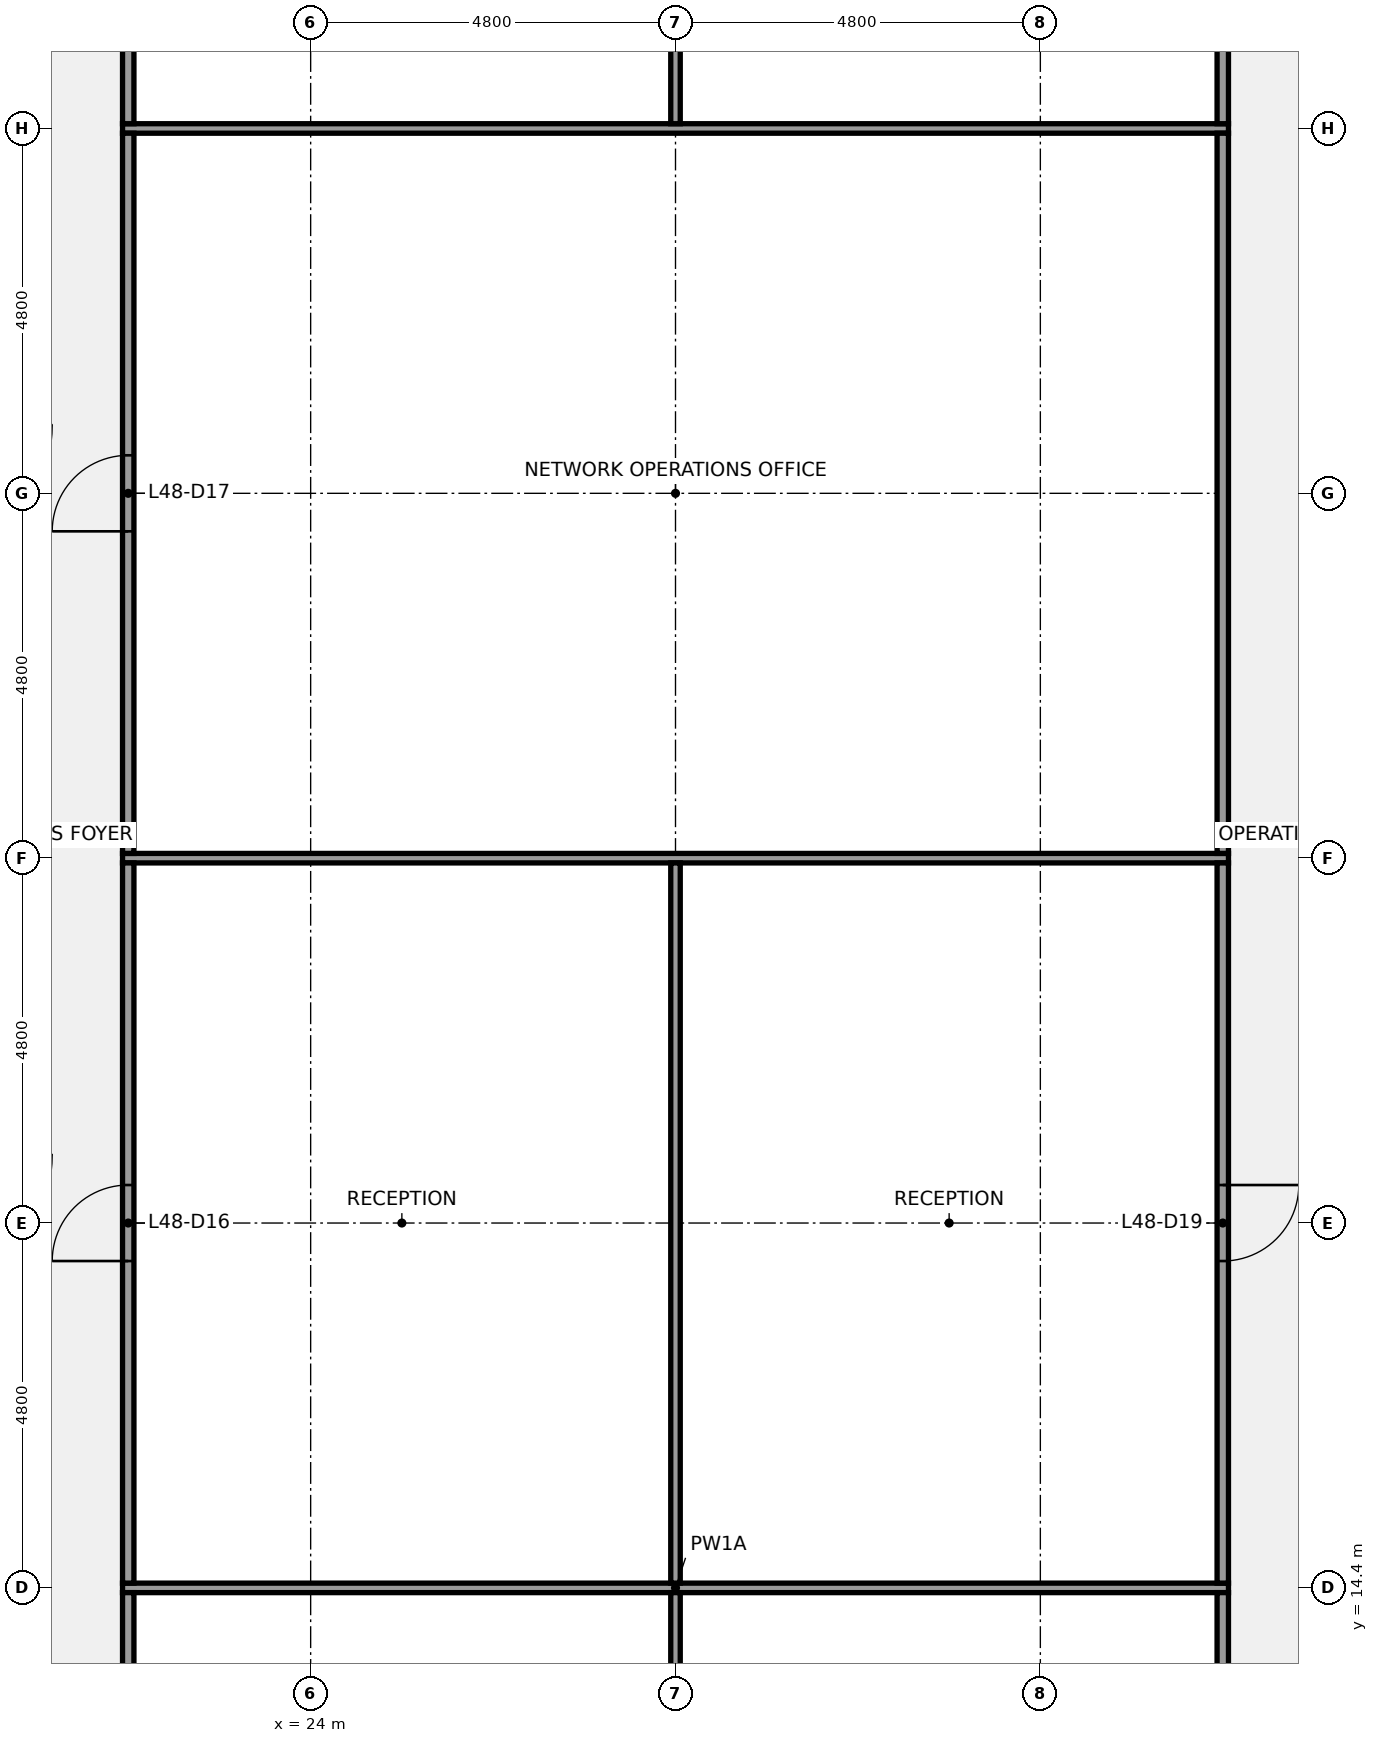
"""IFC4 building model, lengths in metres.
Left out: names, types, materials, properties, quantities, classifications, styles, units other than length and angle.
Written with IfcOpenShell. Run it as: python <this file> out.ifc"""

import sys

from ifc_helpers import new_model, si_unit, direction, frame, frame_2d, origin, place, context, subcontext, project, spatial, rectangle, extrude, element, fill, save


model = new_model("IFC4")
c1 = context("Model", 3, precision=1e-05, world=origin(), true_north=direction((0.0, 1.0)))
c2 = subcontext(c1, "Body", "Model", "MODEL_VIEW")
j1 = project(units=[si_unit("LENGTHUNIT", "METRE"), si_unit("PLANEANGLEUNIT", "RADIAN")], contexts=[c1])
p1 = place(None, origin())
s1 = spatial("IfcSite", under=j1, at=p1, CompositionType="ELEMENT")
p2 = place(p1, origin())
s2 = spatial("IfcBuilding", under=s1, at=p2, CompositionType="ELEMENT")
p3 = place(p2, frame((0.0, 0.0, 221.2)))
s3 = spatial("IfcBuildingStorey", under=s2, at=p3, CompositionType="ELEMENT", Elevation=221.2)
for number, where, z_axis, x_axis in (
    (1, (21.525, 14.4, 0.0), (0.0, 0.0, 1.0), (1.0, 0.0, 0.0)),
    (2, (21.525, 24.0, 0.0), (0.0, 0.0, 1.0), (1.0, 0.0, 0.0)),
    (3, (21.525, 33.6, 0.0), (0.0, 0.0, 1.0), (1.0, 0.0, 0.0)),
):
    element("IfcWall", number, at=place(p3, frame(where, z_axis=z_axis, x_axis=x_axis)), inside=s3, PredefinedType="PARTITIONING", context=c2, shape_type="SweptSolid", body=[
        extrude(rectangle(XDim=14.55, YDim=0.125, at=frame_2d((7.275, 0.0))), origin(), (0.0, 0.0, 1.0), 2.87),
    ])
p4 = place(p3, frame((21.6, 7.275, 0.0), z_axis=(0.0, 0.0, 1.0), x_axis=(0.0, 1.0, 0.0)))
e4 = element("IfcWall", 4, at=p4, inside=s3, PredefinedType="PARTITIONING", context=c2, shape_type="SweptSolid", body=[
    extrude(rectangle(XDim=7.062, YDim=0.15, at=frame_2d((3.531, 0.0))), origin(), (0.0, 0.0, 1.0), 2.87),
])
p5 = place(p4, frame((3.031, 0.0, 0.0)))
e5 = element("IfcOpeningElement", 5, at=p5, cuts=e4, PredefinedType="OPENING", context=c2, shape_type="SweptSolid", body=[
    extrude(rectangle(XDim=1.0, YDim=2.1, at=frame_2d((0.5, 1.05))), frame((0.0, 0.085, 0.0), z_axis=(0.0, -1.0, 0.0), x_axis=(1.0, 0.0, 0.0)), (0.0, 0.0, 1.0), 0.17),
])
p6 = place(p3, frame((21.6, 14.462, 0.0), z_axis=(0.0, 0.0, 1.0), x_axis=(0.0, 1.0, 0.0)))
e6 = element("IfcWall", 6, at=p6, inside=s3, PredefinedType="PARTITIONING", context=c2, shape_type="SweptSolid", body=[
    extrude(rectangle(XDim=9.475, YDim=0.15, at=frame_2d((4.738, 0.0))), origin(), (0.0, 0.0, 1.0), 2.87),
])
p7 = place(p6, frame((4.238, 0.0, 0.0)))
e7 = element("IfcOpeningElement", 7, at=p7, cuts=e6, PredefinedType="OPENING", context=c2, shape_type="SweptSolid", body=[
    extrude(rectangle(XDim=1.0, YDim=2.1, at=frame_2d((0.5, 1.05))), frame((0.0, 0.085, 0.0), z_axis=(0.0, -1.0, 0.0), x_axis=(1.0, 0.0, 0.0)), (0.0, 0.0, 1.0), 0.17),
])
p8 = place(p3, frame((21.6, 24.062, 0.0), z_axis=(0.0, 0.0, 1.0), x_axis=(0.0, 1.0, 0.0)))
e8 = element("IfcWall", 8, at=p8, inside=s3, PredefinedType="PARTITIONING", context=c2, shape_type="SweptSolid", body=[
    extrude(rectangle(XDim=9.475, YDim=0.15, at=frame_2d((4.738, 0.0))), origin(), (0.0, 0.0, 1.0), 2.87),
])
p9 = place(p8, frame((4.238, 0.0, 0.0)))
e9 = element("IfcOpeningElement", 9, at=p9, cuts=e8, PredefinedType="OPENING", context=c2, shape_type="SweptSolid", body=[
    extrude(rectangle(XDim=1.0, YDim=2.1, at=frame_2d((0.5, 1.05))), frame((0.0, 0.085, 0.0), z_axis=(0.0, -1.0, 0.0), x_axis=(1.0, 0.0, 0.0)), (0.0, 0.0, 1.0), 0.17),
])
p10 = place(p3, frame((21.6, 33.663, 0.0), z_axis=(0.0, 0.0, 1.0), x_axis=(0.0, 1.0, 0.0)))
e10 = element("IfcWall", 10, at=p10, inside=s3, PredefinedType="PARTITIONING", context=c2, shape_type="SweptSolid", body=[
    extrude(rectangle(XDim=7.062, YDim=0.15, at=frame_2d((3.531, 0.0))), origin(), (0.0, 0.0, 1.0), 2.87),
])
p11 = place(p3, frame((28.8, 7.275, 0.0), z_axis=(0.0, 0.0, 1.0), x_axis=(0.0, 1.0, 0.0)))
e11 = element("IfcWall", 11, at=p11, inside=s3, PredefinedType="PARTITIONING", context=c2, shape_type="SweptSolid", body=[
    extrude(rectangle(XDim=7.062, YDim=0.125, at=frame_2d((3.531, 0.0))), origin(), (0.0, 0.0, 1.0), 2.87),
])
p12 = place(p3, frame((28.8, 14.462, 0.0), z_axis=(0.0, 0.0, 1.0), x_axis=(0.0, 1.0, 0.0)))
e12 = element("IfcWall", 12, at=p12, inside=s3, PredefinedType="PARTITIONING", context=c2, shape_type="SweptSolid", body=[
    extrude(rectangle(XDim=9.475, YDim=0.125, at=frame_2d((4.738, 0.0))), origin(), (0.0, 0.0, 1.0), 2.87),
])
p13 = place(p3, frame((28.8, 33.663, 0.0), z_axis=(0.0, 0.0, 1.0), x_axis=(0.0, 1.0, 0.0)))
e13 = element("IfcWall", 13, at=p13, inside=s3, PredefinedType="PARTITIONING", context=c2, shape_type="SweptSolid", body=[
    extrude(rectangle(XDim=7.062, YDim=0.125, at=frame_2d((3.531, 0.0))), origin(), (0.0, 0.0, 1.0), 2.87),
])
p14 = place(p3, frame((36.0, 7.275, 0.0), z_axis=(0.0, 0.0, 1.0), x_axis=(0.0, 1.0, 0.0)))
e14 = element("IfcWall", 14, at=p14, inside=s3, PredefinedType="PARTITIONING", context=c2, shape_type="SweptSolid", body=[
    extrude(rectangle(XDim=7.062, YDim=0.15, at=frame_2d((3.531, 0.0))), origin(), (0.0, 0.0, 1.0), 2.87),
])
p15 = place(p14, frame((3.031, 0.0, 0.0)))
e15 = element("IfcOpeningElement", 15, at=p15, cuts=e14, PredefinedType="OPENING", context=c2, shape_type="SweptSolid", body=[
    extrude(rectangle(XDim=1.0, YDim=2.1, at=frame_2d((0.5, 1.05))), frame((0.0, 0.085, 0.0), z_axis=(0.0, -1.0, 0.0), x_axis=(1.0, 0.0, 0.0)), (0.0, 0.0, 1.0), 0.17),
])
p16 = place(p3, frame((36.0, 14.462, 0.0), z_axis=(0.0, 0.0, 1.0), x_axis=(0.0, 1.0, 0.0)))
e16 = element("IfcWall", 16, at=p16, inside=s3, PredefinedType="PARTITIONING", context=c2, shape_type="SweptSolid", body=[
    extrude(rectangle(XDim=9.475, YDim=0.15, at=frame_2d((4.738, 0.0))), origin(), (0.0, 0.0, 1.0), 2.87),
])
p17 = place(p16, frame((4.238, 0.0, 0.0)))
e17 = element("IfcOpeningElement", 17, at=p17, cuts=e16, PredefinedType="OPENING", context=c2, shape_type="SweptSolid", body=[
    extrude(rectangle(XDim=1.0, YDim=2.1, at=frame_2d((0.5, 1.05))), frame((0.0, 0.085, 0.0), z_axis=(0.0, -1.0, 0.0), x_axis=(1.0, 0.0, 0.0)), (0.0, 0.0, 1.0), 0.17),
])
p18 = place(p3, frame((36.0, 24.062, 0.0), z_axis=(0.0, 0.0, 1.0), x_axis=(0.0, 1.0, 0.0)))
e18 = element("IfcWall", 18, at=p18, inside=s3, PredefinedType="PARTITIONING", context=c2, shape_type="SweptSolid", body=[
    extrude(rectangle(XDim=9.475, YDim=0.15, at=frame_2d((4.738, 0.0))), origin(), (0.0, 0.0, 1.0), 2.87),
])
p19 = place(p3, frame((36.0, 33.663, 0.0), z_axis=(0.0, 0.0, 1.0), x_axis=(0.0, 1.0, 0.0)))
e19 = element("IfcWall", 19, at=p19, inside=s3, PredefinedType="PARTITIONING", context=c2, shape_type="SweptSolid", body=[
    extrude(rectangle(XDim=7.062, YDim=0.15, at=frame_2d((3.531, 0.0))), origin(), (0.0, 0.0, 1.0), 2.87),
])
p20 = place(p7, origin())
e20 = element("IfcDoor", 20, at=p20, inside=s3, OperationType="SINGLE_SWING_LEFT", PredefinedType="DOOR", context=c2, shape_type="SweptSolid", body=[
    extrude(rectangle(XDim=1.0, YDim=2.1, at=frame_2d((0.5, 1.05))), frame((0.0, 0.025, 0.0), z_axis=(0.0, -1.0, 0.0), x_axis=(1.0, 0.0, 0.0)), (0.0, 0.0, 1.0), 0.05),
])
fill(e7, e20)
p21 = place(p9, origin())
e21 = element("IfcDoor", 21, at=p21, inside=s3, OperationType="SINGLE_SWING_LEFT", PredefinedType="DOOR", context=c2, shape_type="SweptSolid", body=[
    extrude(rectangle(XDim=1.0, YDim=2.1, at=frame_2d((0.5, 1.05))), frame((0.0, 0.025, 0.0), z_axis=(0.0, -1.0, 0.0), x_axis=(1.0, 0.0, 0.0)), (0.0, 0.0, 1.0), 0.05),
])
fill(e9, e21)
p22 = place(p17, origin())
e22 = element("IfcDoor", 22, at=p22, inside=s3, OperationType="SINGLE_SWING_RIGHT", PredefinedType="DOOR", context=c2, shape_type="SweptSolid", body=[
    extrude(rectangle(XDim=1.0, YDim=2.1, at=frame_2d((0.5, 1.05))), frame((0.0, 0.025, 0.0), z_axis=(0.0, -1.0, 0.0), x_axis=(1.0, 0.0, 0.0)), (0.0, 0.0, 1.0), 0.05),
])
fill(e17, e22)
save(model, sys.argv[1])
